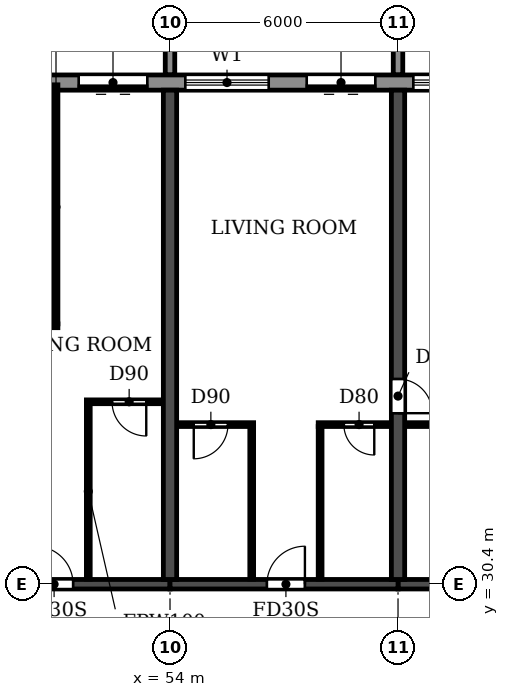
"""IFC4 building model, lengths in metres.
Left out: names, types, materials, properties, quantities, classifications, styles, units other than length and angle.
Written with IfcOpenShell. Run it as: python <this file> out.ifc"""

import sys

from ifc_helpers import new_model, si_unit, direction, frame, frame_2d, origin, place, context, subcontext, project, spatial, polyline, rectangle, outline, extrude, source, transform, mapped, element, fill, save


model = new_model("IFC4")
c1 = context("Model", 3, precision=1e-05, world=origin(), true_north=direction((0.0, 1.0)))
c2 = subcontext(c1, "Body", "Model", "MODEL_VIEW")
j1 = project(units=[si_unit("LENGTHUNIT", "METRE"), si_unit("PLANEANGLEUNIT", "RADIAN")], contexts=[c1])
p1 = place(None, origin())
s1 = spatial("IfcSite", under=j1, at=p1, CompositionType="ELEMENT")
p2 = place(p1, origin())
s2 = spatial("IfcBuilding", under=s1, at=p2, CompositionType="ELEMENT")
p3 = place(p2, frame((0.0, 0.0, 76.2)))
s3 = spatial("IfcBuildingStorey", under=s2, at=p3, CompositionType="ELEMENT", Elevation=76.2)
p4 = place(p3, frame((54.0, 30.525, 0.0), z_axis=(0.0, 0.0, 1.0), x_axis=(0.0, 1.0, 0.0)))
e1 = element("IfcWall", 1, at=p4, inside=s3, PredefinedType="SHEAR", context=c2, shape_type="SweptSolid", body=[
    extrude(rectangle(XDim=12.875, YDim=0.35, at=frame_2d((6.438, 0.0))), origin(), (0.0, 0.0, 1.0), 3.06),
])
p5 = place(p3, frame((60.0, 30.525, 0.0), z_axis=(0.0, 0.0, 1.0), x_axis=(0.0, 1.0, 0.0)))
e2 = element("IfcWall", 2, at=p5, inside=s3, PredefinedType="SHEAR", context=c2, shape_type="SweptSolid", body=[
    extrude(rectangle(XDim=12.875, YDim=0.35, at=frame_2d((6.438, 0.0))), origin(), (0.0, 0.0, 1.0), 3.06),
])
p6 = place(p5, frame((4.375, 0.0, 0.0)))
e3 = element("IfcOpeningElement", 3, at=p6, cuts=e2, PredefinedType="OPENING", context=c2, shape_type="SweptSolid", body=[
    extrude(rectangle(XDim=0.9, YDim=2.1, at=frame_2d((0.45, 1.05))), frame((0.0, 0.185, 0.0), z_axis=(0.0, -1.0, 0.0), x_axis=(1.0, 0.0, 0.0)), (0.0, 0.0, 1.0), 0.37),
])
p7 = place(p3, frame((48.0, 30.4, 0.0), z_axis=(0.0, 0.0, 1.0), x_axis=(1.0, 0.0, 0.0)))
e4 = element("IfcWall", 4, at=p7, inside=s3, PredefinedType="SHEAR", context=c2, shape_type="SweptSolid", body=[
    extrude(rectangle(XDim=6.0, YDim=0.25, at=frame_2d((3.0, 0.0))), origin(), (0.0, 0.0, 1.0), 2.46),
])
p8 = place(p7, frame((2.45, 0.0, 0.0)))
e5 = element("IfcOpeningElement", 5, at=p8, cuts=e4, PredefinedType="OPENING", context=c2, shape_type="SweptSolid", body=[
    extrude(rectangle(XDim=1.0, YDim=2.1, at=frame_2d((0.5, 1.05))), frame((0.0, 0.135, 0.0), z_axis=(0.0, -1.0, 0.0), x_axis=(1.0, 0.0, 0.0)), (0.0, 0.0, 1.0), 0.27),
])
p9 = place(p3, frame((54.0, 30.4, 0.0), z_axis=(0.0, 0.0, 1.0), x_axis=(1.0, 0.0, 0.0)))
e6 = element("IfcWall", 6, at=p9, inside=s3, PredefinedType="SHEAR", context=c2, shape_type="SweptSolid", body=[
    extrude(rectangle(XDim=6.0, YDim=0.25, at=frame_2d((3.0, 0.0))), origin(), (0.0, 0.0, 1.0), 2.46),
])
p10 = place(p9, frame((2.55, 0.0, 0.0)))
e7 = element("IfcOpeningElement", 7, at=p10, cuts=e6, PredefinedType="OPENING", context=c2, shape_type="SweptSolid", body=[
    extrude(rectangle(XDim=1.0, YDim=2.1, at=frame_2d((0.5, 1.05))), frame((0.0, 0.135, 0.0), z_axis=(0.0, -1.0, 0.0), x_axis=(1.0, 0.0, 0.0)), (0.0, 0.0, 1.0), 0.27),
])
p11 = place(p3, frame((60.0, 30.4, 0.0), z_axis=(0.0, 0.0, 1.0), x_axis=(1.0, 0.0, 0.0)))
e8 = element("IfcWall", 8, at=p11, inside=s3, PredefinedType="SHEAR", context=c2, shape_type="SweptSolid", body=[
    extrude(rectangle(XDim=6.0, YDim=0.25, at=frame_2d((3.0, 0.0))), origin(), (0.0, 0.0, 1.0), 2.46),
])
p12 = place(p3, frame((91.317, 43.6, 0.0), z_axis=(0.0, 0.0, 1.0), x_axis=(-1.0, 0.0, 0.0)))
e9 = element("IfcWall", 9, at=p12, inside=s3, PredefinedType="STANDARD", context=c2, shape_type="SweptSolid", body=[
    extrude(rectangle(XDim=80.634, YDim=0.4, at=frame_2d((40.317, 0.0))), origin(), (0.0, 0.0, 1.0), 3.06),
])
p13 = place(p12, frame((76.717, 0.0, 0.9)))
e10 = element("IfcOpeningElement", 10, at=p13, cuts=e9, PredefinedType="OPENING", context=c2, shape_type="SweptSolid", body=[
    extrude(rectangle(XDim=2.2, YDim=1.5, at=frame_2d((1.1, 0.75))), frame((0.0, 0.21, 0.0), z_axis=(0.0, -1.0, 0.0), x_axis=(1.0, 0.0, 0.0)), (0.0, 0.0, 1.0), 0.42),
])
p14 = place(p12, frame((73.917, 0.0, 0.0)))
e11 = element("IfcOpeningElement", 11, at=p14, cuts=e9, PredefinedType="OPENING", context=c2, shape_type="SweptSolid", body=[
    extrude(rectangle(XDim=1.8, YDim=2.4, at=frame_2d((0.9, 1.2))), frame((0.0, 0.21, 0.0), z_axis=(0.0, -1.0, 0.0), x_axis=(1.0, 0.0, 0.0)), (0.0, 0.0, 1.0), 0.42),
])
p15 = place(p12, frame((70.917, 0.0, 0.0)))
e12 = element("IfcOpeningElement", 12, at=p15, cuts=e9, PredefinedType="OPENING", context=c2, shape_type="SweptSolid", body=[
    extrude(rectangle(XDim=1.8, YDim=2.4, at=frame_2d((0.9, 1.2))), frame((0.0, 0.21, 0.0), z_axis=(0.0, -1.0, 0.0), x_axis=(1.0, 0.0, 0.0)), (0.0, 0.0, 1.0), 0.42),
])
p16 = place(p12, frame((67.717, 0.0, 0.9)))
e13 = element("IfcOpeningElement", 13, at=p16, cuts=e9, PredefinedType="OPENING", context=c2, shape_type="SweptSolid", body=[
    extrude(rectangle(XDim=2.2, YDim=1.5, at=frame_2d((1.1, 0.75))), frame((0.0, 0.21, 0.0), z_axis=(0.0, -1.0, 0.0), x_axis=(1.0, 0.0, 0.0)), (0.0, 0.0, 1.0), 0.42),
])
p17 = place(p12, frame((64.717, 0.0, 0.9)))
e14 = element("IfcOpeningElement", 14, at=p17, cuts=e9, PredefinedType="OPENING", context=c2, shape_type="SweptSolid", body=[
    extrude(rectangle(XDim=2.2, YDim=1.5, at=frame_2d((1.1, 0.75))), frame((0.0, 0.21, 0.0), z_axis=(0.0, -1.0, 0.0), x_axis=(1.0, 0.0, 0.0)), (0.0, 0.0, 1.0), 0.42),
])
p18 = place(p12, frame((61.917, 0.0, 0.0)))
e15 = element("IfcOpeningElement", 15, at=p18, cuts=e9, PredefinedType="OPENING", context=c2, shape_type="SweptSolid", body=[
    extrude(rectangle(XDim=1.8, YDim=2.4, at=frame_2d((0.9, 1.2))), frame((0.0, 0.21, 0.0), z_axis=(0.0, -1.0, 0.0), x_axis=(1.0, 0.0, 0.0)), (0.0, 0.0, 1.0), 0.42),
])
p19 = place(p12, frame((58.717, 0.0, 0.9)))
e16 = element("IfcOpeningElement", 16, at=p19, cuts=e9, PredefinedType="OPENING", context=c2, shape_type="SweptSolid", body=[
    extrude(rectangle(XDim=2.2, YDim=1.5, at=frame_2d((1.1, 0.75))), frame((0.0, 0.21, 0.0), z_axis=(0.0, -1.0, 0.0), x_axis=(1.0, 0.0, 0.0)), (0.0, 0.0, 1.0), 0.42),
])
p20 = place(p12, frame((55.917, 0.0, 0.0)))
e17 = element("IfcOpeningElement", 17, at=p20, cuts=e9, PredefinedType="OPENING", context=c2, shape_type="SweptSolid", body=[
    extrude(rectangle(XDim=1.8, YDim=2.4, at=frame_2d((0.9, 1.2))), frame((0.0, 0.21, 0.0), z_axis=(0.0, -1.0, 0.0), x_axis=(1.0, 0.0, 0.0)), (0.0, 0.0, 1.0), 0.42),
])
p21 = place(p12, frame((52.717, 0.0, 0.9)))
e18 = element("IfcOpeningElement", 18, at=p21, cuts=e9, PredefinedType="OPENING", context=c2, shape_type="SweptSolid", body=[
    extrude(rectangle(XDim=2.2, YDim=1.5, at=frame_2d((1.1, 0.75))), frame((0.0, 0.21, 0.0), z_axis=(0.0, -1.0, 0.0), x_axis=(1.0, 0.0, 0.0)), (0.0, 0.0, 1.0), 0.42),
])
p22 = place(p12, frame((49.717, 0.0, 0.9)))
e19 = element("IfcOpeningElement", 19, at=p22, cuts=e9, PredefinedType="OPENING", context=c2, shape_type="SweptSolid", body=[
    extrude(rectangle(XDim=2.2, YDim=1.5, at=frame_2d((1.1, 0.75))), frame((0.0, 0.21, 0.0), z_axis=(0.0, -1.0, 0.0), x_axis=(1.0, 0.0, 0.0)), (0.0, 0.0, 1.0), 0.42),
])
p23 = place(p12, frame((46.917, 0.0, 0.0)))
e20 = element("IfcOpeningElement", 20, at=p23, cuts=e9, PredefinedType="OPENING", context=c2, shape_type="SweptSolid", body=[
    extrude(rectangle(XDim=1.8, YDim=2.4, at=frame_2d((0.9, 1.2))), frame((0.0, 0.21, 0.0), z_axis=(0.0, -1.0, 0.0), x_axis=(1.0, 0.0, 0.0)), (0.0, 0.0, 1.0), 0.42),
])
p24 = place(p12, frame((43.717, 0.0, 0.9)))
e21 = element("IfcOpeningElement", 21, at=p24, cuts=e9, PredefinedType="OPENING", context=c2, shape_type="SweptSolid", body=[
    extrude(rectangle(XDim=2.2, YDim=1.5, at=frame_2d((1.1, 0.75))), frame((0.0, 0.21, 0.0), z_axis=(0.0, -1.0, 0.0), x_axis=(1.0, 0.0, 0.0)), (0.0, 0.0, 1.0), 0.42),
])
p25 = place(p12, frame((40.717, 0.0, 0.9)))
e22 = element("IfcOpeningElement", 22, at=p25, cuts=e9, PredefinedType="OPENING", context=c2, shape_type="SweptSolid", body=[
    extrude(rectangle(XDim=2.2, YDim=1.5, at=frame_2d((1.1, 0.75))), frame((0.0, 0.21, 0.0), z_axis=(0.0, -1.0, 0.0), x_axis=(1.0, 0.0, 0.0)), (0.0, 0.0, 1.0), 0.42),
])
p26 = place(p12, frame((37.917, 0.0, 0.0)))
e23 = element("IfcOpeningElement", 23, at=p26, cuts=e9, PredefinedType="OPENING", context=c2, shape_type="SweptSolid", body=[
    extrude(rectangle(XDim=1.8, YDim=2.4, at=frame_2d((0.9, 1.2))), frame((0.0, 0.21, 0.0), z_axis=(0.0, -1.0, 0.0), x_axis=(1.0, 0.0, 0.0)), (0.0, 0.0, 1.0), 0.42),
])
p27 = place(p12, frame((34.717, 0.0, 0.9)))
e24 = element("IfcOpeningElement", 24, at=p27, cuts=e9, PredefinedType="OPENING", context=c2, shape_type="SweptSolid", body=[
    extrude(rectangle(XDim=2.2, YDim=1.5, at=frame_2d((1.1, 0.75))), frame((0.0, 0.21, 0.0), z_axis=(0.0, -1.0, 0.0), x_axis=(1.0, 0.0, 0.0)), (0.0, 0.0, 1.0), 0.42),
])
p28 = place(p12, frame((31.917, 0.0, 0.0)))
e25 = element("IfcOpeningElement", 25, at=p28, cuts=e9, PredefinedType="OPENING", context=c2, shape_type="SweptSolid", body=[
    extrude(rectangle(XDim=1.8, YDim=2.4, at=frame_2d((0.9, 1.2))), frame((0.0, 0.21, 0.0), z_axis=(0.0, -1.0, 0.0), x_axis=(1.0, 0.0, 0.0)), (0.0, 0.0, 1.0), 0.42),
])
p29 = place(p12, frame((28.717, 0.0, 0.9)))
e26 = element("IfcOpeningElement", 26, at=p29, cuts=e9, PredefinedType="OPENING", context=c2, shape_type="SweptSolid", body=[
    extrude(rectangle(XDim=2.2, YDim=1.5, at=frame_2d((1.1, 0.75))), frame((0.0, 0.21, 0.0), z_axis=(0.0, -1.0, 0.0), x_axis=(1.0, 0.0, 0.0)), (0.0, 0.0, 1.0), 0.42),
])
p30 = place(p12, frame((25.717, 0.0, 0.9)))
e27 = element("IfcOpeningElement", 27, at=p30, cuts=e9, PredefinedType="OPENING", context=c2, shape_type="SweptSolid", body=[
    extrude(rectangle(XDim=2.2, YDim=1.5, at=frame_2d((1.1, 0.75))), frame((0.0, 0.21, 0.0), z_axis=(0.0, -1.0, 0.0), x_axis=(1.0, 0.0, 0.0)), (0.0, 0.0, 1.0), 0.42),
])
p31 = place(p12, frame((22.717, 0.0, 0.9)))
e28 = element("IfcOpeningElement", 28, at=p31, cuts=e9, PredefinedType="OPENING", context=c2, shape_type="SweptSolid", body=[
    extrude(rectangle(XDim=2.2, YDim=1.5, at=frame_2d((1.1, 0.75))), frame((0.0, 0.21, 0.0), z_axis=(0.0, -1.0, 0.0), x_axis=(1.0, 0.0, 0.0)), (0.0, 0.0, 1.0), 0.42),
])
p32 = place(p12, frame((19.917, 0.0, 0.0)))
e29 = element("IfcOpeningElement", 29, at=p32, cuts=e9, PredefinedType="OPENING", context=c2, shape_type="SweptSolid", body=[
    extrude(rectangle(XDim=1.8, YDim=2.4, at=frame_2d((0.9, 1.2))), frame((0.0, 0.21, 0.0), z_axis=(0.0, -1.0, 0.0), x_axis=(1.0, 0.0, 0.0)), (0.0, 0.0, 1.0), 0.42),
])
p33 = place(p12, frame((16.717, 0.0, 0.9)))
e30 = element("IfcOpeningElement", 30, at=p33, cuts=e9, PredefinedType="OPENING", context=c2, shape_type="SweptSolid", body=[
    extrude(rectangle(XDim=2.2, YDim=1.5, at=frame_2d((1.1, 0.75))), frame((0.0, 0.21, 0.0), z_axis=(0.0, -1.0, 0.0), x_axis=(1.0, 0.0, 0.0)), (0.0, 0.0, 1.0), 0.42),
])
p34 = place(p12, frame((13.717, 0.0, 0.9)))
e31 = element("IfcOpeningElement", 31, at=p34, cuts=e9, PredefinedType="OPENING", context=c2, shape_type="SweptSolid", body=[
    extrude(rectangle(XDim=2.2, YDim=1.5, at=frame_2d((1.1, 0.75))), frame((0.0, 0.21, 0.0), z_axis=(0.0, -1.0, 0.0), x_axis=(1.0, 0.0, 0.0)), (0.0, 0.0, 1.0), 0.42),
])
p35 = place(p12, frame((10.717, 0.0, 0.9)))
e32 = element("IfcOpeningElement", 32, at=p35, cuts=e9, PredefinedType="OPENING", context=c2, shape_type="SweptSolid", body=[
    extrude(rectangle(XDim=2.2, YDim=1.5, at=frame_2d((1.1, 0.75))), frame((0.0, 0.21, 0.0), z_axis=(0.0, -1.0, 0.0), x_axis=(1.0, 0.0, 0.0)), (0.0, 0.0, 1.0), 0.42),
])
p36 = place(p12, frame((7.917, 0.0, 0.0)))
e33 = element("IfcOpeningElement", 33, at=p36, cuts=e9, PredefinedType="OPENING", context=c2, shape_type="SweptSolid", body=[
    extrude(rectangle(XDim=1.8, YDim=2.4, at=frame_2d((0.9, 1.2))), frame((0.0, 0.21, 0.0), z_axis=(0.0, -1.0, 0.0), x_axis=(1.0, 0.0, 0.0)), (0.0, 0.0, 1.0), 0.42),
])
p37 = place(p12, frame((4.717, 0.0, 0.9)))
e34 = element("IfcOpeningElement", 34, at=p37, cuts=e9, PredefinedType="OPENING", context=c2, shape_type="SweptSolid", body=[
    extrude(rectangle(XDim=2.2, YDim=1.5, at=frame_2d((1.1, 0.75))), frame((0.0, 0.21, 0.0), z_axis=(0.0, -1.0, 0.0), x_axis=(1.0, 0.0, 0.0)), (0.0, 0.0, 1.0), 0.42),
])
p38 = place(p12, frame((1.917, 0.0, 0.0)))
e35 = element("IfcOpeningElement", 35, at=p38, cuts=e9, PredefinedType="OPENING", context=c2, shape_type="SweptSolid", body=[
    extrude(rectangle(XDim=1.8, YDim=2.4, at=frame_2d((0.9, 1.2))), frame((0.0, 0.21, 0.0), z_axis=(0.0, -1.0, 0.0), x_axis=(1.0, 0.0, 0.0)), (0.0, 0.0, 1.0), 0.42),
])
m1 = source(origin(), c2, "Body", "SweptSolid", [
    extrude(outline(polyline([(0.0, 0.0), (0.25, 0.0), (0.25, 3.1), (0.0, 3.1), (0.0, 0.0)])), origin(), (0.0, 0.0, 1.0), 3.1),
])
for number, where in (
    (36, (53.875, 43.8, 0.0)),
    (37, (59.875, 43.8, 0.0)),
):
    element("IfcWall", number, at=place(p3, frame(where)), inside=s3, PredefinedType="STANDARD", context=c2, shape_type="MappedRepresentation", body=[
        mapped(m1, transform((0.0, 0.0, 0.0))),
    ])
p39 = place(p3, frame((54.185, 34.6, 0.0), z_axis=(0.0, 0.0, 1.0), x_axis=(1.0, 0.0, 0.0)))
e38 = element("IfcWall", 38, at=p39, inside=s3, PredefinedType="PARTITIONING", context=c2, shape_type="SweptSolid", body=[
    extrude(rectangle(XDim=2.015, YDim=0.1, at=frame_2d((1.007, 0.0))), origin(), (0.0, 0.0, 1.0), 3.06),
])
p40 = place(p39, frame((0.44, 0.0, 0.0)))
e39 = element("IfcOpeningElement", 39, at=p40, cuts=e38, PredefinedType="OPENING", context=c2, shape_type="SweptSolid", body=[
    extrude(rectangle(XDim=0.9, YDim=2.1, at=frame_2d((0.45, 1.05))), frame((0.0, 0.06, 0.0), z_axis=(0.0, -1.0, 0.0), x_axis=(1.0, 0.0, 0.0)), (0.0, 0.0, 1.0), 0.12),
])
p41 = place(p3, frame((57.9, 34.6, 0.0), z_axis=(0.0, 0.0, 1.0), x_axis=(1.0, 0.0, 0.0)))
e40 = element("IfcWall", 40, at=p41, inside=s3, PredefinedType="PARTITIONING", context=c2, shape_type="SweptSolid", body=[
    extrude(rectangle(XDim=1.915, YDim=0.1, at=frame_2d((0.958, 0.0))), origin(), (0.0, 0.0, 1.0), 3.06),
])
p42 = place(p41, frame((0.675, 0.0, 0.0)))
e41 = element("IfcOpeningElement", 41, at=p42, cuts=e40, PredefinedType="OPENING", context=c2, shape_type="SweptSolid", body=[
    extrude(rectangle(XDim=0.8, YDim=2.1, at=frame_2d((0.4, 1.05))), frame((0.0, 0.06, 0.0), z_axis=(0.0, -1.0, 0.0), x_axis=(1.0, 0.0, 0.0)), (0.0, 0.0, 1.0), 0.12),
])
p43 = place(p3, frame((60.185, 34.6, 0.0), z_axis=(0.0, 0.0, 1.0), x_axis=(1.0, 0.0, 0.0)))
e42 = element("IfcWall", 42, at=p43, inside=s3, PredefinedType="PARTITIONING", context=c2, shape_type="SweptSolid", body=[
    extrude(rectangle(XDim=2.715, YDim=0.1, at=frame_2d((1.357, 0.0))), origin(), (0.0, 0.0, 1.0), 3.06),
])
p44 = place(p43, frame((0.915, 0.0, 0.0)))
e43 = element("IfcOpeningElement", 43, at=p44, cuts=e42, PredefinedType="OPENING", context=c2, shape_type="SweptSolid", body=[
    extrude(rectangle(XDim=0.8, YDim=2.1, at=frame_2d((0.4, 1.05))), frame((0.0, 0.06, 0.0), z_axis=(0.0, -1.0, 0.0), x_axis=(1.0, 0.0, 0.0)), (0.0, 0.0, 1.0), 0.12),
])
p45 = place(p3, frame((51.8, 35.2, 0.0), z_axis=(0.0, 0.0, 1.0), x_axis=(1.0, 0.0, 0.0)))
e44 = element("IfcWall", 44, at=p45, inside=s3, PredefinedType="PARTITIONING", context=c2, shape_type="SweptSolid", body=[
    extrude(rectangle(XDim=2.015, YDim=0.1, at=frame_2d((1.007, 0.0))), origin(), (0.0, 0.0, 1.0), 3.06),
])
p46 = place(p45, frame((0.675, 0.0, 0.0)))
e45 = element("IfcOpeningElement", 45, at=p46, cuts=e44, PredefinedType="OPENING", context=c2, shape_type="SweptSolid", body=[
    extrude(rectangle(XDim=0.9, YDim=2.1, at=frame_2d((0.45, 1.05))), frame((0.0, 0.06, 0.0), z_axis=(0.0, -1.0, 0.0), x_axis=(1.0, 0.0, 0.0)), (0.0, 0.0, 1.0), 0.12),
])
p47 = place(p3, frame((48.185, 37.2, 0.0), z_axis=(0.0, 0.0, 1.0), x_axis=(1.0, 0.0, 0.0)))
e46 = element("IfcWall", 46, at=p47, inside=s3, PredefinedType="PARTITIONING", context=c2, shape_type="SweptSolid", body=[
    extrude(rectangle(XDim=2.865, YDim=0.1, at=frame_2d((1.433, 0.0))), origin(), (0.0, 0.0, 1.0), 3.06),
])
p48 = place(p47, frame((0.315, 0.0, 0.0)))
e47 = element("IfcOpeningElement", 47, at=p48, cuts=e46, PredefinedType="OPENING", context=c2, shape_type="SweptSolid", body=[
    extrude(rectangle(XDim=0.9, YDim=2.1, at=frame_2d((0.45, 1.05))), frame((0.0, 0.06, 0.0), z_axis=(0.0, -1.0, 0.0), x_axis=(1.0, 0.0, 0.0)), (0.0, 0.0, 1.0), 0.12),
])
p49 = place(p3, frame((51.0, 37.25, 0.0), z_axis=(0.0, 0.0, 1.0), x_axis=(0.0, 1.0, 0.0)))
e48 = element("IfcWall", 48, at=p49, inside=s3, PredefinedType="PARTITIONING", context=c2, shape_type="SweptSolid", body=[
    extrude(rectangle(XDim=6.29, YDim=0.1, at=frame_2d((3.145, 0.0))), origin(), (0.0, 0.0, 1.0), 3.06),
])
p50 = place(p3, frame((51.85, 30.535, 0.0), z_axis=(0.0, 0.0, 1.0), x_axis=(0.0, 1.0, 0.0)))
e49 = element("IfcWall", 49, at=p50, inside=s3, PredefinedType="PARTITIONING", context=c2, shape_type="SweptSolid", body=[
    extrude(rectangle(XDim=4.615, YDim=0.1, at=frame_2d((2.308, 0.0))), origin(), (0.0, 0.0, 1.0), 3.06),
])
for number, where, z_axis, x_axis in (
    (50, (56.15, 30.535, 0.0), (0.0, 0.0, 1.0), (0.0, 1.0, 0.0)),
    (51, (57.95, 30.535, 0.0), (0.0, 0.0, 1.0), (0.0, 1.0, 0.0)),
):
    element("IfcWall", number, at=place(p3, frame(where, z_axis=z_axis, x_axis=x_axis)), inside=s3, PredefinedType="PARTITIONING", context=c2, shape_type="SweptSolid", body=[
        extrude(rectangle(XDim=4.015, YDim=0.1, at=frame_2d((2.008, 0.0))), origin(), (0.0, 0.0, 1.0), 3.06),
    ])
p51 = place(p26, origin())
e52 = element("IfcDoor", 52, at=p51, inside=s3, OperationType="DOUBLE_DOOR_SLIDING", PredefinedType="DOOR", context=c2, shape_type="SweptSolid", body=[
    extrude(rectangle(XDim=1.8, YDim=2.4, at=frame_2d((0.9, 1.2))), frame((0.0, 0.025, 0.0), z_axis=(0.0, -1.0, 0.0), x_axis=(1.0, 0.0, 0.0)), (0.0, 0.0, 1.0), 0.05),
])
fill(e23, e52)
p52 = place(p27, origin())
e53 = element("IfcWindow", 53, at=p52, inside=s3, PartitioningType="DOUBLE_PANEL_HORIZONTAL", PredefinedType="WINDOW", context=c2, shape_type="SweptSolid", body=[
    extrude(rectangle(XDim=2.2, YDim=1.5, at=frame_2d((1.1, 0.75))), frame((0.0, 0.03, 0.0), z_axis=(0.0, -1.0, 0.0), x_axis=(1.0, 0.0, 0.0)), (0.0, 0.0, 1.0), 0.06),
])
fill(e24, e53)
p53 = place(p28, origin())
e54 = element("IfcDoor", 54, at=p53, inside=s3, OperationType="DOUBLE_DOOR_SLIDING", PredefinedType="DOOR", context=c2, shape_type="SweptSolid", body=[
    extrude(rectangle(XDim=1.8, YDim=2.4, at=frame_2d((0.9, 1.2))), frame((0.0, 0.025, 0.0), z_axis=(0.0, -1.0, 0.0), x_axis=(1.0, 0.0, 0.0)), (0.0, 0.0, 1.0), 0.05),
])
fill(e25, e54)
p54 = place(p29, origin())
e55 = element("IfcWindow", 55, at=p54, inside=s3, PartitioningType="DOUBLE_PANEL_HORIZONTAL", PredefinedType="WINDOW", context=c2, shape_type="SweptSolid", body=[
    extrude(rectangle(XDim=2.2, YDim=1.5, at=frame_2d((1.1, 0.75))), frame((0.0, 0.03, 0.0), z_axis=(0.0, -1.0, 0.0), x_axis=(1.0, 0.0, 0.0)), (0.0, 0.0, 1.0), 0.06),
])
fill(e26, e55)
p55 = place(p8, origin())
e56 = element("IfcDoor", 56, at=p55, inside=s3, OperationType="SINGLE_SWING_LEFT", PredefinedType="DOOR", context=c2, shape_type="SweptSolid", body=[
    extrude(rectangle(XDim=1.0, YDim=2.1, at=frame_2d((0.5, 1.05))), frame((0.0, 0.025, 0.0), z_axis=(0.0, -1.0, 0.0), x_axis=(1.0, 0.0, 0.0)), (0.0, 0.0, 1.0), 0.05),
])
fill(e5, e56)
p56 = place(p46, frame((0.9, 0.0, 0.0), z_axis=(0.0, 0.0, 1.0), x_axis=(-1.0, 0.0, 0.0)))
e57 = element("IfcDoor", 57, at=p56, inside=s3, OperationType="SINGLE_SWING_LEFT", PredefinedType="DOOR", context=c2, shape_type="SweptSolid", body=[
    extrude(rectangle(XDim=0.9, YDim=2.1, at=frame_2d((0.45, 1.05))), frame((0.0, 0.025, 0.0), z_axis=(0.0, -1.0, 0.0), x_axis=(1.0, 0.0, 0.0)), (0.0, 0.0, 1.0), 0.05),
])
fill(e45, e57)
p57 = place(p40, frame((0.9, 0.0, 0.0), z_axis=(0.0, 0.0, 1.0), x_axis=(-1.0, 0.0, 0.0)))
e58 = element("IfcDoor", 58, at=p57, inside=s3, OperationType="SINGLE_SWING_RIGHT", PredefinedType="DOOR", context=c2, shape_type="SweptSolid", body=[
    extrude(rectangle(XDim=0.9, YDim=2.1, at=frame_2d((0.45, 1.05))), frame((0.0, 0.025, 0.0), z_axis=(0.0, -1.0, 0.0), x_axis=(1.0, 0.0, 0.0)), (0.0, 0.0, 1.0), 0.05),
])
fill(e39, e58)
p58 = place(p10, origin())
e59 = element("IfcDoor", 59, at=p58, inside=s3, OperationType="SINGLE_SWING_RIGHT", PredefinedType="DOOR", context=c2, shape_type="SweptSolid", body=[
    extrude(rectangle(XDim=1.0, YDim=2.1, at=frame_2d((0.5, 1.05))), frame((0.0, 0.025, 0.0), z_axis=(0.0, -1.0, 0.0), x_axis=(1.0, 0.0, 0.0)), (0.0, 0.0, 1.0), 0.05),
])
fill(e7, e59)
p59 = place(p42, frame((0.8, 0.0, 0.0), z_axis=(0.0, 0.0, 1.0), x_axis=(-1.0, 0.0, 0.0)))
e60 = element("IfcDoor", 60, at=p59, inside=s3, OperationType="SINGLE_SWING_LEFT", PredefinedType="DOOR", context=c2, shape_type="SweptSolid", body=[
    extrude(rectangle(XDim=0.8, YDim=2.1, at=frame_2d((0.4, 1.05))), frame((0.0, 0.025, 0.0), z_axis=(0.0, -1.0, 0.0), x_axis=(1.0, 0.0, 0.0)), (0.0, 0.0, 1.0), 0.05),
])
fill(e41, e60)
p60 = place(p6, frame((0.9, 0.0, 0.0), z_axis=(0.0, 0.0, 1.0), x_axis=(-1.0, 0.0, 0.0)))
e61 = element("IfcDoor", 61, at=p60, inside=s3, OperationType="SINGLE_SWING_RIGHT", PredefinedType="DOOR", context=c2, shape_type="SweptSolid", body=[
    extrude(rectangle(XDim=0.9, YDim=2.1, at=frame_2d((0.45, 1.05))), frame((0.0, 0.025, 0.0), z_axis=(0.0, -1.0, 0.0), x_axis=(1.0, 0.0, 0.0)), (0.0, 0.0, 1.0), 0.05),
])
fill(e3, e61)
save(model, sys.argv[1])
